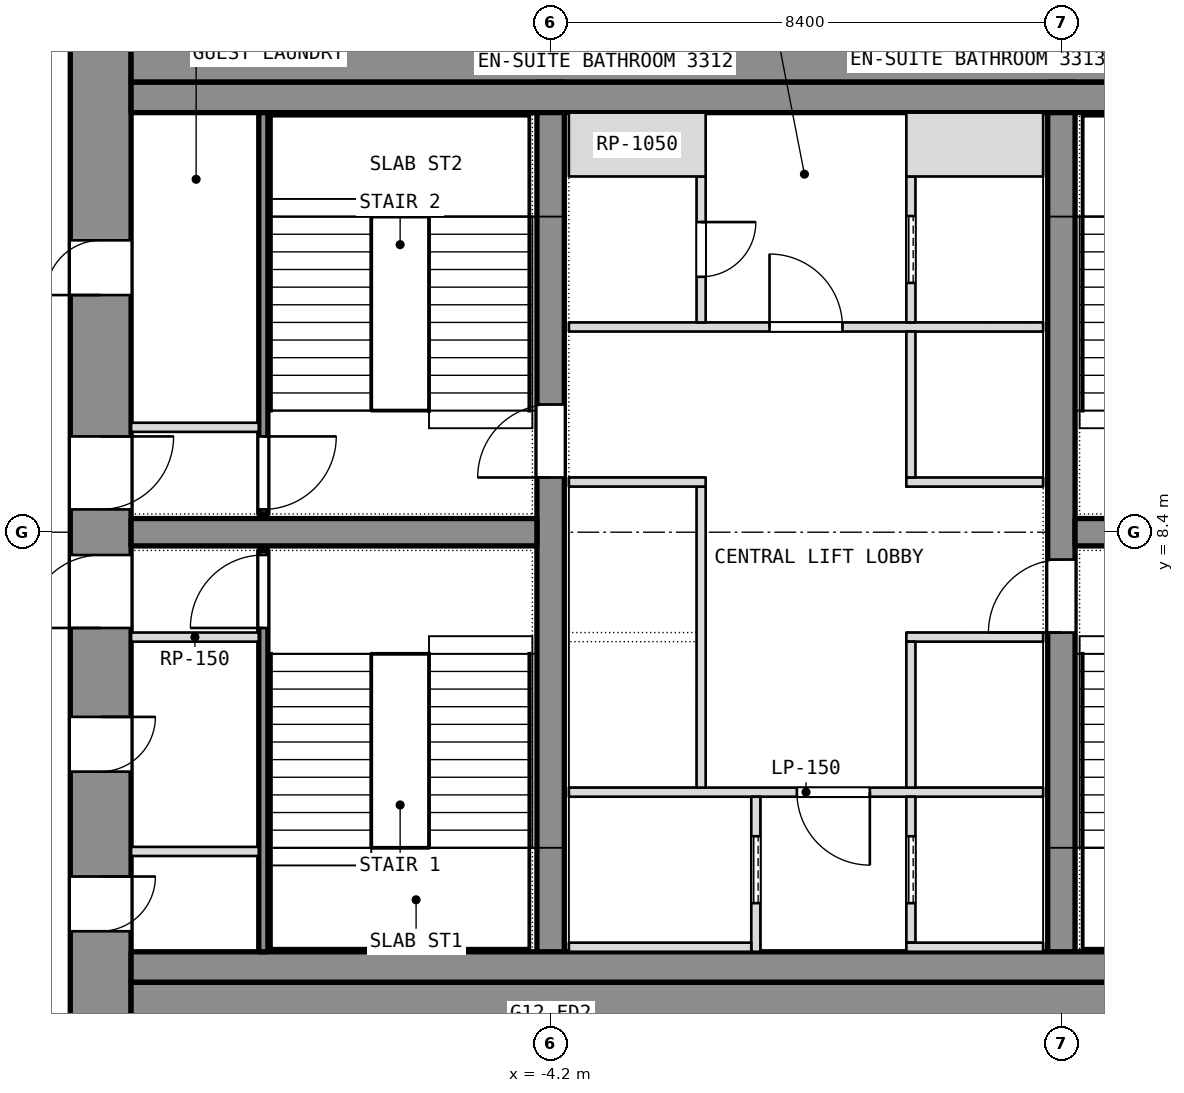
"""IFC4 building model, lengths in metres.
Left out: names, types, materials, properties, quantities, classifications, styles, units other than length and angle.
Written with IfcOpenShell. Run it as: python <this file> out.ifc"""

import sys

from ifc_helpers import new_model, si_unit, direction, frame, frame_2d, origin, place, context, subcontext, project, spatial, rectangle, extrude, element, fill, save


model = new_model("IFC4")
c1 = context("Model", 3, precision=1e-05, world=origin(), true_north=direction((0.0, 1.0)))
c2 = subcontext(c1, "Body", "Model", "MODEL_VIEW")
j1 = project(units=[si_unit("LENGTHUNIT", "METRE"), si_unit("PLANEANGLEUNIT", "RADIAN")], contexts=[c1])
p1 = place(None, origin())
s1 = spatial("IfcSite", under=j1, at=p1, CompositionType="ELEMENT")
p2 = place(p1, origin())
s2 = spatial("IfcBuilding", under=s1, at=p2, CompositionType="ELEMENT")
p3 = place(p2, frame((0.0, 0.0, 144.5)))
s3 = spatial("IfcBuildingStorey", under=s2, at=p3, CompositionType="ELEMENT", Elevation=144.5)
p4 = place(p3, frame((-11.6, 0.0, 0.0), z_axis=(0.0, 0.0, 1.0), x_axis=(0.0, 1.0, 0.0)))
e1 = element("IfcWall", 1, at=p4, inside=s3, PredefinedType="SHEAR", context=c2, shape_type="SweptSolid", body=[
    extrude(rectangle(XDim=16.8, YDim=1.0, at=frame_2d((8.4, 0.0))), origin(), (0.0, 0.0, 1.0), 3.6),
])
p5 = place(p4, frame((1.837, 0.0, 0.0)))
e2 = element("IfcOpeningElement", 2, at=p5, cuts=e1, PredefinedType="OPENING", context=c2, shape_type="SweptSolid", body=[
    extrude(rectangle(XDim=0.9, YDim=2.1, at=frame_2d((0.45, 1.05))), frame((0.0, 0.5, 0.0), z_axis=(0.0, -1.0, 0.0), x_axis=(1.0, 0.0, 0.0)), (0.0, 0.0, 1.0), 1.0),
])
p6 = place(p4, frame((4.462, 0.0, 0.0)))
e3 = element("IfcOpeningElement", 3, at=p6, cuts=e1, PredefinedType="OPENING", context=c2, shape_type="SweptSolid", body=[
    extrude(rectangle(XDim=0.9, YDim=2.1, at=frame_2d((0.45, 1.05))), frame((0.0, 0.5, 0.0), z_axis=(0.0, -1.0, 0.0), x_axis=(1.0, 0.0, 0.0)), (0.0, 0.0, 1.0), 1.0),
])
p7 = place(p4, frame((6.825, 0.0, 0.0)))
e4 = element("IfcOpeningElement", 4, at=p7, cuts=e1, PredefinedType="OPENING", context=c2, shape_type="SweptSolid", body=[
    extrude(rectangle(XDim=1.2, YDim=2.1, at=frame_2d((0.6, 1.05))), frame((0.0, 0.5, 0.0), z_axis=(0.0, -1.0, 0.0), x_axis=(1.0, 0.0, 0.0)), (0.0, 0.0, 1.0), 1.0),
])
p8 = place(p4, frame((12.3, 0.0, 0.0)))
e5 = element("IfcOpeningElement", 5, at=p8, cuts=e1, PredefinedType="OPENING", context=c2, shape_type="SweptSolid", body=[
    extrude(rectangle(XDim=0.9, YDim=2.1, at=frame_2d((0.45, 1.05))), frame((0.0, 0.5, 0.0), z_axis=(0.0, -1.0, 0.0), x_axis=(1.0, 0.0, 0.0)), (0.0, 0.0, 1.0), 1.0),
])
p9 = place(p4, frame((8.775, 0.0, 0.0)))
e6 = element("IfcOpeningElement", 6, at=p9, cuts=e1, PredefinedType="OPENING", context=c2, shape_type="SweptSolid", body=[
    extrude(rectangle(XDim=1.2, YDim=2.1, at=frame_2d((0.6, 1.05))), frame((0.0, 0.5, 0.0), z_axis=(0.0, -1.0, 0.0), x_axis=(1.0, 0.0, 0.0)), (0.0, 0.0, 1.0), 1.0),
])
for number, where, z_axis, x_axis in (
    (7, (-11.1, 0.5, 0.0), (0.0, 0.0, 1.0), (1.0, 0.0, 0.0)),
    (8, (-11.1, 16.3, 0.0), (0.0, 0.0, 1.0), (1.0, 0.0, 0.0)),
):
    element("IfcWall", number, at=place(p3, frame(where, z_axis=z_axis, x_axis=x_axis)), inside=s3, PredefinedType="SHEAR", context=c2, shape_type="SweptSolid", body=[
        extrude(rectangle(XDim=22.2, YDim=1.0, at=frame_2d((11.1, 0.0))), origin(), (0.0, 0.0, 1.0), 3.6),
    ])
p10 = place(p3, frame((-4.2, 1.0, 0.0), z_axis=(0.0, 0.0, 1.0), x_axis=(0.0, 1.0, 0.0)))
e9 = element("IfcWall", 9, at=p10, inside=s3, PredefinedType="SHEAR", context=c2, shape_type="SweptSolid", body=[
    extrude(rectangle(XDim=14.8, YDim=0.45, at=frame_2d((7.4, 0.0))), origin(), (0.0, 0.0, 1.0), 3.6),
])
p11 = place(p10, frame((8.3, 0.0, 0.0)))
e10 = element("IfcOpeningElement", 10, at=p11, cuts=e9, PredefinedType="OPENING", context=c2, shape_type="SweptSolid", body=[
    extrude(rectangle(XDim=1.2, YDim=2.1, at=frame_2d((0.6, 1.05))), frame((0.0, 0.225, 0.0), z_axis=(0.0, -1.0, 0.0), x_axis=(1.0, 0.0, 0.0)), (0.0, 0.0, 1.0), 0.45),
])
p12 = place(p3, frame((4.2, 1.0, 0.0), z_axis=(0.0, 0.0, 1.0), x_axis=(0.0, 1.0, 0.0)))
e11 = element("IfcWall", 11, at=p12, inside=s3, PredefinedType="SHEAR", context=c2, shape_type="SweptSolid", body=[
    extrude(rectangle(XDim=14.8, YDim=0.45, at=frame_2d((7.4, 0.0))), origin(), (0.0, 0.0, 1.0), 3.6),
])
p13 = place(p12, frame((5.75, 0.0, 0.0)))
e12 = element("IfcOpeningElement", 12, at=p13, cuts=e11, PredefinedType="OPENING", context=c2, shape_type="SweptSolid", body=[
    extrude(rectangle(XDim=1.2, YDim=2.1, at=frame_2d((0.6, 1.05))), frame((0.0, 0.225, 0.0), z_axis=(0.0, -1.0, 0.0), x_axis=(1.0, 0.0, 0.0)), (0.0, 0.0, 1.0), 0.45),
])
for number, where, z_axis, x_axis in (
    (13, (-11.1, 8.4, 0.0), (0.0, 0.0, 1.0), (1.0, 0.0, 0.0)),
    (14, (4.425, 8.4, 0.0), (0.0, 0.0, 1.0), (1.0, 0.0, 0.0)),
):
    element("IfcWall", number, at=place(p3, frame(where, z_axis=z_axis, x_axis=x_axis)), inside=s3, PredefinedType="SHEAR", context=c2, shape_type="SweptSolid", body=[
        extrude(rectangle(XDim=6.675, YDim=0.45, at=frame_2d((3.337, 0.0))), origin(), (0.0, 0.0, 1.0), 3.6),
    ])
for number, where, z_axis, x_axis in (
    (15, (-11.1, 1.25, 0.0), (0.0, 0.0, 1.0), (1.0, 0.0, 0.0)),
    (16, (-11.1, 15.55, 0.0), (0.0, 0.0, 1.0), (1.0, 0.0, 0.0)),
):
    element("IfcWall", number, at=place(p3, frame(where, z_axis=z_axis, x_axis=x_axis)), inside=s3, PredefinedType="PARTITIONING", context=c2, shape_type="SweptSolid", body=[
        extrude(rectangle(XDim=22.2, YDim=0.5, at=frame_2d((11.1, 0.0))), origin(), (0.0, 0.0, 1.0), 3.34),
    ])
p14 = place(p3, frame((-8.925, 1.5, 0.0), z_axis=(0.0, 0.0, 1.0), x_axis=(0.0, 1.0, 0.0)))
e17 = element("IfcWall", 17, at=p14, inside=s3, PredefinedType="SHEAR", context=c2, shape_type="SweptSolid", body=[
    extrude(rectangle(XDim=6.6, YDim=0.15, at=frame_2d((3.3, 0.0))), origin(), (0.0, 0.0, 1.0), 3.34),
])
p15 = place(p14, frame((5.325, 0.0, 0.0)))
e18 = element("IfcOpeningElement", 18, at=p15, cuts=e17, PredefinedType="OPENING", context=c2, shape_type="SweptSolid", body=[
    extrude(rectangle(XDim=1.2, YDim=2.1, at=frame_2d((0.6, 1.05))), frame((0.0, 0.075, 0.0), z_axis=(0.0, -1.0, 0.0), x_axis=(1.0, 0.0, 0.0)), (0.0, 0.0, 1.0), 0.15),
])
for number, where, z_axis, x_axis in (
    (19, (-11.1, 6.675, 0.0), (0.0, 0.0, 1.0), (1.0, 0.0, 0.0)),
    (20, (-11.1, 3.15, 0.0), (0.0, 0.0, 1.0), (1.0, 0.0, 0.0)),
):
    element("IfcWall", number, at=place(p3, frame(where, z_axis=z_axis, x_axis=x_axis)), inside=s3, PredefinedType="PARTITIONING", context=c2, shape_type="SweptSolid", body=[
        extrude(rectangle(XDim=2.1, YDim=0.15, at=frame_2d((1.05, 0.0))), origin(), (0.0, 0.0, 1.0), 3.34),
    ])
p16 = place(p3, frame((-8.925, 8.7, 0.0), z_axis=(0.0, 0.0, 1.0), x_axis=(0.0, 1.0, 0.0)))
e21 = element("IfcWall", 21, at=p16, inside=s3, PredefinedType="SHEAR", context=c2, shape_type="SweptSolid", body=[
    extrude(rectangle(XDim=6.6, YDim=0.15, at=frame_2d((3.3, 0.0))), origin(), (0.0, 0.0, 1.0), 3.34),
])
p17 = place(p16, frame((0.075, 0.0, 0.0)))
e22 = element("IfcOpeningElement", 22, at=p17, cuts=e21, PredefinedType="OPENING", context=c2, shape_type="SweptSolid", body=[
    extrude(rectangle(XDim=1.2, YDim=2.1, at=frame_2d((0.6, 1.05))), frame((0.0, 0.075, 0.0), z_axis=(0.0, -1.0, 0.0), x_axis=(1.0, 0.0, 0.0)), (0.0, 0.0, 1.0), 0.15),
])
p18 = place(p3, frame((-11.1, 10.125, 0.0), z_axis=(0.0, 0.0, 1.0), x_axis=(1.0, 0.0, 0.0)))
e23 = element("IfcWall", 23, at=p18, inside=s3, PredefinedType="PARTITIONING", context=c2, shape_type="SweptSolid", body=[
    extrude(rectangle(XDim=2.1, YDim=0.15, at=frame_2d((1.05, 0.0))), origin(), (0.0, 0.0, 1.0), 3.34),
])
p19 = place(p3, frame((-3.9, 4.125, 0.0), z_axis=(0.0, 0.0, 1.0), x_axis=(1.0, 0.0, 0.0)))
e24 = element("IfcWall", 24, at=p19, inside=s3, PredefinedType="PARTITIONING", context=c2, shape_type="SweptSolid", body=[
    extrude(rectangle(XDim=7.8, YDim=0.15, at=frame_2d((3.9, 0.0))), origin(), (0.0, 0.0, 1.0), 3.34),
])
p20 = place(p19, frame((3.75, 0.0, 0.0)))
e25 = element("IfcOpeningElement", 25, at=p20, cuts=e24, PredefinedType="OPENING", context=c2, shape_type="SweptSolid", body=[
    extrude(rectangle(XDim=1.2, YDim=2.1, at=frame_2d((0.6, 1.05))), frame((0.0, 0.075, 0.0), z_axis=(0.0, -1.0, 0.0), x_axis=(1.0, 0.0, 0.0)), (0.0, 0.0, 1.0), 0.15),
])
p21 = place(p3, frame((-3.9, 11.775, 0.0), z_axis=(0.0, 0.0, 1.0), x_axis=(1.0, 0.0, 0.0)))
e26 = element("IfcWall", 26, at=p21, inside=s3, PredefinedType="PARTITIONING", context=c2, shape_type="SweptSolid", body=[
    extrude(rectangle(XDim=7.8, YDim=0.15, at=frame_2d((3.9, 0.0))), origin(), (0.0, 0.0, 1.0), 3.34),
])
p22 = place(p21, frame((3.3, 0.0, 0.0)))
e27 = element("IfcOpeningElement", 27, at=p22, cuts=e26, PredefinedType="OPENING", context=c2, shape_type="SweptSolid", body=[
    extrude(rectangle(XDim=1.2, YDim=2.1, at=frame_2d((0.6, 1.05))), frame((0.0, 0.075, 0.0), z_axis=(0.0, -1.0, 0.0), x_axis=(1.0, 0.0, 0.0)), (0.0, 0.0, 1.0), 0.15),
])
p23 = place(p3, frame((-0.825, 1.5, 0.0), z_axis=(0.0, 0.0, 1.0), x_axis=(0.0, 1.0, 0.0)))
e28 = element("IfcWall", 28, at=p23, inside=s3, PredefinedType="SHEAR", context=c2, shape_type="SweptSolid", body=[
    extrude(rectangle(XDim=2.55, YDim=0.15, at=frame_2d((1.275, 0.0))), origin(), (0.0, 0.0, 1.0), 3.6),
])
p24 = place(p23, frame((0.8, 0.0, 0.0)))
e29 = element("IfcOpeningElement", 29, at=p24, cuts=e28, PredefinedType="OPENING", context=c2, shape_type="SweptSolid", body=[
    extrude(rectangle(XDim=1.1, YDim=2.1, at=frame_2d((0.55, 1.05))), frame((0.0, 0.075, 0.0), z_axis=(0.0, -1.0, 0.0), x_axis=(1.0, 0.0, 0.0)), (0.0, 0.0, 1.0), 0.15),
])
p25 = place(p3, frame((-3.9, 1.575, 0.0), z_axis=(0.0, 0.0, 1.0), x_axis=(1.0, 0.0, 0.0)))
e30 = element("IfcWall", 30, at=p25, inside=s3, PredefinedType="SHEAR", context=c2, shape_type="SweptSolid", body=[
    extrude(rectangle(XDim=3.0, YDim=0.15, at=frame_2d((1.5, 0.0))), origin(), (0.0, 0.0, 1.0), 3.6),
])
p26 = place(p3, frame((-1.725, 4.2, 0.0), z_axis=(0.0, 0.0, 1.0), x_axis=(0.0, 1.0, 0.0)))
e31 = element("IfcWall", 31, at=p26, inside=s3, PredefinedType="SHEAR", context=c2, shape_type="SweptSolid", body=[
    extrude(rectangle(XDim=4.95, YDim=0.15, at=frame_2d((2.475, 0.0))), origin(), (0.0, 0.0, 1.0), 3.6),
])
p27 = place(p3, frame((-3.9, 9.225, 0.0), z_axis=(0.0, 0.0, 1.0), x_axis=(1.0, 0.0, 0.0)))
e32 = element("IfcWall", 32, at=p27, inside=s3, PredefinedType="SHEAR", context=c2, shape_type="SweptSolid", body=[
    extrude(rectangle(XDim=2.25, YDim=0.15, at=frame_2d((1.125, 0.0))), origin(), (0.0, 0.0, 1.0), 3.6),
])
p28 = place(p3, frame((-1.725, 11.85, 0.0), z_axis=(0.0, 0.0, 1.0), x_axis=(0.0, 1.0, 0.0)))
e33 = element("IfcWall", 33, at=p28, inside=s3, PredefinedType="PARTITIONING", context=c2, shape_type="SweptSolid", body=[
    extrude(rectangle(XDim=2.4, YDim=0.15, at=frame_2d((1.2, 0.0))), origin(), (0.0, 0.0, 1.0), 3.34),
])
p29 = place(p28, frame((0.75, 0.0, 0.0)))
e34 = element("IfcOpeningElement", 34, at=p29, cuts=e33, PredefinedType="OPENING", context=c2, shape_type="SweptSolid", body=[
    extrude(rectangle(XDim=0.9, YDim=2.1, at=frame_2d((0.45, 1.05))), frame((0.0, 0.075, 0.0), z_axis=(0.0, -1.0, 0.0), x_axis=(1.0, 0.0, 0.0)), (0.0, 0.0, 1.0), 0.15),
])
p30 = place(p3, frame((-3.9, 14.775, 0.0), z_axis=(0.0, 0.0, 1.0), x_axis=(1.0, 0.0, 0.0)))
e35 = element("IfcWall", 35, at=p30, inside=s3, PredefinedType="PARTITIONING", context=c2, shape_type="SweptSolid", body=[
    extrude(rectangle(XDim=2.25, YDim=1.05, at=frame_2d((1.125, 0.0))), origin(), (0.0, 0.0, 1.0), 3.34),
])
p31 = place(p3, frame((1.725, 1.65, 0.0), z_axis=(0.0, 0.0, 1.0), x_axis=(0.0, 1.0, 0.0)))
e36 = element("IfcWall", 36, at=p31, inside=s3, PredefinedType="SHEAR", context=c2, shape_type="SweptSolid", body=[
    extrude(rectangle(XDim=2.4, YDim=0.15, at=frame_2d((1.2, 0.0))), origin(), (0.0, 0.0, 1.0), 3.6),
])
p32 = place(p31, frame((0.65, 0.0, 0.0)))
e37 = element("IfcOpeningElement", 37, at=p32, cuts=e36, PredefinedType="OPENING", context=c2, shape_type="SweptSolid", body=[
    extrude(rectangle(XDim=1.1, YDim=2.1, at=frame_2d((0.55, 1.05))), frame((0.0, 0.075, 0.0), z_axis=(0.0, -1.0, 0.0), x_axis=(1.0, 0.0, 0.0)), (0.0, 0.0, 1.0), 0.15),
])
p33 = place(p3, frame((1.65, 1.575, 0.0), z_axis=(0.0, 0.0, 1.0), x_axis=(1.0, 0.0, 0.0)))
e38 = element("IfcWall", 38, at=p33, inside=s3, PredefinedType="SHEAR", context=c2, shape_type="SweptSolid", body=[
    extrude(rectangle(XDim=2.25, YDim=0.15, at=frame_2d((1.125, 0.0))), origin(), (0.0, 0.0, 1.0), 3.6),
])
p34 = place(p3, frame((1.725, 11.85, 0.0), z_axis=(0.0, 0.0, 1.0), x_axis=(0.0, 1.0, 0.0)))
e39 = element("IfcWall", 39, at=p34, inside=s3, PredefinedType="SHEAR", context=c2, shape_type="SweptSolid", body=[
    extrude(rectangle(XDim=2.4, YDim=0.15, at=frame_2d((1.2, 0.0))), origin(), (0.0, 0.0, 1.0), 3.6),
])
p35 = place(p34, frame((0.65, 0.0, 0.0)))
e40 = element("IfcOpeningElement", 40, at=p35, cuts=e39, PredefinedType="OPENING", context=c2, shape_type="SweptSolid", body=[
    extrude(rectangle(XDim=1.1, YDim=2.1, at=frame_2d((0.55, 1.05))), frame((0.0, 0.075, 0.0), z_axis=(0.0, -1.0, 0.0), x_axis=(1.0, 0.0, 0.0)), (0.0, 0.0, 1.0), 0.15),
])
p36 = place(p3, frame((1.65, 14.775, 0.0), z_axis=(0.0, 0.0, 1.0), x_axis=(1.0, 0.0, 0.0)))
e41 = element("IfcWall", 41, at=p36, inside=s3, PredefinedType="SHEAR", context=c2, shape_type="SweptSolid", body=[
    extrude(rectangle(XDim=2.25, YDim=1.05, at=frame_2d((1.125, 0.0))), origin(), (0.0, 0.0, 1.0), 3.6),
])
for number, where, z_axis, x_axis in (
    (42, (1.65, 6.675, 0.0), (0.0, 0.0, 1.0), (1.0, 0.0, 0.0)),
    (43, (1.65, 9.225, 0.0), (0.0, 0.0, 1.0), (1.0, 0.0, 0.0)),
):
    element("IfcWall", number, at=place(p3, frame(where, z_axis=z_axis, x_axis=x_axis)), inside=s3, PredefinedType="SHEAR", context=c2, shape_type="SweptSolid", body=[
        extrude(rectangle(XDim=2.25, YDim=0.15, at=frame_2d((1.125, 0.0))), origin(), (0.0, 0.0, 1.0), 3.6),
    ])
p37 = place(p3, frame((1.725, 4.2, 0.0), z_axis=(0.0, 0.0, 1.0), x_axis=(0.0, 1.0, 0.0)))
e44 = element("IfcWall", 44, at=p37, inside=s3, PredefinedType="SHEAR", context=c2, shape_type="SweptSolid", body=[
    extrude(rectangle(XDim=2.4, YDim=0.15, at=frame_2d((1.2, 0.0))), origin(), (0.0, 0.0, 1.0), 3.6),
])
p38 = place(p3, frame((1.725, 9.3, 0.0), z_axis=(0.0, 0.0, 1.0), x_axis=(0.0, 1.0, 0.0)))
e45 = element("IfcWall", 45, at=p38, inside=s3, PredefinedType="SHEAR", context=c2, shape_type="SweptSolid", body=[
    extrude(rectangle(XDim=2.4, YDim=0.15, at=frame_2d((1.2, 0.0))), origin(), (0.0, 0.0, 1.0), 3.6),
])
p39 = place(p5, origin())
e46 = element("IfcDoor", 46, at=p39, inside=s3, OperationType="SINGLE_SWING_LEFT", PredefinedType="DOOR", context=c2, shape_type="SweptSolid", body=[
    extrude(rectangle(XDim=0.9, YDim=2.1, at=frame_2d((0.45, 1.05))), frame((0.0, 0.025, 0.0), z_axis=(0.0, -1.0, 0.0), x_axis=(1.0, 0.0, 0.0)), (0.0, 0.0, 1.0), 0.05),
])
fill(e2, e46)
p40 = place(p6, origin())
e47 = element("IfcDoor", 47, at=p40, inside=s3, OperationType="SINGLE_SWING_LEFT", PredefinedType="DOOR", context=c2, shape_type="SweptSolid", body=[
    extrude(rectangle(XDim=0.9, YDim=2.1, at=frame_2d((0.45, 1.05))), frame((0.0, 0.025, 0.0), z_axis=(0.0, -1.0, 0.0), x_axis=(1.0, 0.0, 0.0)), (0.0, 0.0, 1.0), 0.05),
])
fill(e3, e47)
p41 = place(p7, origin())
e48 = element("IfcDoor", 48, at=p41, inside=s3, OperationType="SINGLE_SWING_LEFT", PredefinedType="DOOR", context=c2, shape_type="SweptSolid", body=[
    extrude(rectangle(XDim=1.2, YDim=2.1, at=frame_2d((0.6, 1.05))), frame((0.0, 0.025, 0.0), z_axis=(0.0, -1.0, 0.0), x_axis=(1.0, 0.0, 0.0)), (0.0, 0.0, 1.0), 0.05),
])
fill(e4, e48)
p42 = place(p15, origin())
e49 = element("IfcDoor", 49, at=p42, inside=s3, OperationType="SINGLE_SWING_LEFT", PredefinedType="DOOR", context=c2, shape_type="SweptSolid", body=[
    extrude(rectangle(XDim=1.2, YDim=2.1, at=frame_2d((0.6, 1.05))), frame((0.0, 0.025, 0.0), z_axis=(0.0, -1.0, 0.0), x_axis=(1.0, 0.0, 0.0)), (0.0, 0.0, 1.0), 0.05),
])
fill(e18, e49)
p43 = place(p8, origin())
e50 = element("IfcDoor", 50, at=p43, inside=s3, OperationType="SINGLE_SWING_LEFT", PredefinedType="DOOR", context=c2, shape_type="SweptSolid", body=[
    extrude(rectangle(XDim=0.9, YDim=2.1, at=frame_2d((0.45, 1.05))), frame((0.0, 0.025, 0.0), z_axis=(0.0, -1.0, 0.0), x_axis=(1.0, 0.0, 0.0)), (0.0, 0.0, 1.0), 0.05),
])
fill(e5, e50)
p44 = place(p9, origin())
e51 = element("IfcDoor", 51, at=p44, inside=s3, OperationType="SINGLE_SWING_LEFT", PredefinedType="DOOR", context=c2, shape_type="SweptSolid", body=[
    extrude(rectangle(XDim=1.2, YDim=2.1, at=frame_2d((0.6, 1.05))), frame((0.0, 0.025, 0.0), z_axis=(0.0, -1.0, 0.0), x_axis=(1.0, 0.0, 0.0)), (0.0, 0.0, 1.0), 0.05),
])
fill(e6, e51)
p45 = place(p17, origin())
e52 = element("IfcDoor", 52, at=p45, inside=s3, OperationType="SINGLE_SWING_LEFT", PredefinedType="DOOR", context=c2, shape_type="SweptSolid", body=[
    extrude(rectangle(XDim=1.2, YDim=2.1, at=frame_2d((0.6, 1.05))), frame((0.0, 0.025, 0.0), z_axis=(0.0, -1.0, 0.0), x_axis=(1.0, 0.0, 0.0)), (0.0, 0.0, 1.0), 0.05),
])
fill(e22, e52)
p46 = place(p24, origin())
e53 = element("IfcDoor", 53, at=p46, inside=s3, OperationType="SLIDING_TO_LEFT", PredefinedType="DOOR", context=c2, shape_type="SweptSolid", body=[
    extrude(rectangle(XDim=1.1, YDim=2.1, at=frame_2d((0.55, 1.05))), frame((0.0, 0.025, 0.0), z_axis=(0.0, -1.0, 0.0), x_axis=(1.0, 0.0, 0.0)), (0.0, 0.0, 1.0), 0.05),
])
fill(e29, e53)
p47 = place(p32, origin())
e54 = element("IfcDoor", 54, at=p47, inside=s3, OperationType="SLIDING_TO_LEFT", PredefinedType="DOOR", context=c2, shape_type="SweptSolid", body=[
    extrude(rectangle(XDim=1.1, YDim=2.1, at=frame_2d((0.55, 1.05))), frame((0.0, 0.025, 0.0), z_axis=(0.0, -1.0, 0.0), x_axis=(1.0, 0.0, 0.0)), (0.0, 0.0, 1.0), 0.05),
])
fill(e37, e54)
p48 = place(p35, origin())
e55 = element("IfcDoor", 55, at=p48, inside=s3, OperationType="SLIDING_TO_LEFT", PredefinedType="DOOR", context=c2, shape_type="SweptSolid", body=[
    extrude(rectangle(XDim=1.1, YDim=2.1, at=frame_2d((0.55, 1.05))), frame((0.0, 0.025, 0.0), z_axis=(0.0, -1.0, 0.0), x_axis=(1.0, 0.0, 0.0)), (0.0, 0.0, 1.0), 0.05),
])
fill(e40, e55)
p49 = place(p20, origin())
e56 = element("IfcDoor", 56, at=p49, inside=s3, OperationType="SINGLE_SWING_LEFT", PredefinedType="DOOR", context=c2, shape_type="SweptSolid", body=[
    extrude(rectangle(XDim=1.2, YDim=2.1, at=frame_2d((0.6, 1.05))), frame((0.0, 0.025, 0.0), z_axis=(0.0, -1.0, 0.0), x_axis=(1.0, 0.0, 0.0)), (0.0, 0.0, 1.0), 0.05),
])
fill(e25, e56)
p50 = place(p22, origin())
e57 = element("IfcDoor", 57, at=p50, inside=s3, OperationType="SINGLE_SWING_LEFT", PredefinedType="DOOR", context=c2, shape_type="SweptSolid", body=[
    extrude(rectangle(XDim=1.2, YDim=2.1, at=frame_2d((0.6, 1.05))), frame((0.0, 0.025, 0.0), z_axis=(0.0, -1.0, 0.0), x_axis=(1.0, 0.0, 0.0)), (0.0, 0.0, 1.0), 0.05),
])
fill(e27, e57)
p51 = place(p29, origin())
e58 = element("IfcDoor", 58, at=p51, inside=s3, OperationType="SINGLE_SWING_LEFT", PredefinedType="DOOR", context=c2, shape_type="SweptSolid", body=[
    extrude(rectangle(XDim=0.9, YDim=2.1, at=frame_2d((0.45, 1.05))), frame((0.0, 0.025, 0.0), z_axis=(0.0, -1.0, 0.0), x_axis=(1.0, 0.0, 0.0)), (0.0, 0.0, 1.0), 0.05),
])
fill(e34, e58)
p52 = place(p11, origin())
e59 = element("IfcDoor", 59, at=p52, inside=s3, OperationType="SINGLE_SWING_LEFT", PredefinedType="DOOR", context=c2, shape_type="SweptSolid", body=[
    extrude(rectangle(XDim=1.2, YDim=2.1, at=frame_2d((0.6, 1.05))), frame((0.0, 0.025, 0.0), z_axis=(0.0, -1.0, 0.0), x_axis=(1.0, 0.0, 0.0)), (0.0, 0.0, 1.0), 0.05),
])
fill(e10, e59)
p53 = place(p13, origin())
e60 = element("IfcDoor", 60, at=p53, inside=s3, OperationType="SINGLE_SWING_LEFT", PredefinedType="DOOR", context=c2, shape_type="SweptSolid", body=[
    extrude(rectangle(XDim=1.2, YDim=2.1, at=frame_2d((0.6, 1.05))), frame((0.0, 0.025, 0.0), z_axis=(0.0, -1.0, 0.0), x_axis=(1.0, 0.0, 0.0)), (0.0, 0.0, 1.0), 0.05),
])
fill(e12, e60)
save(model, sys.argv[1])
